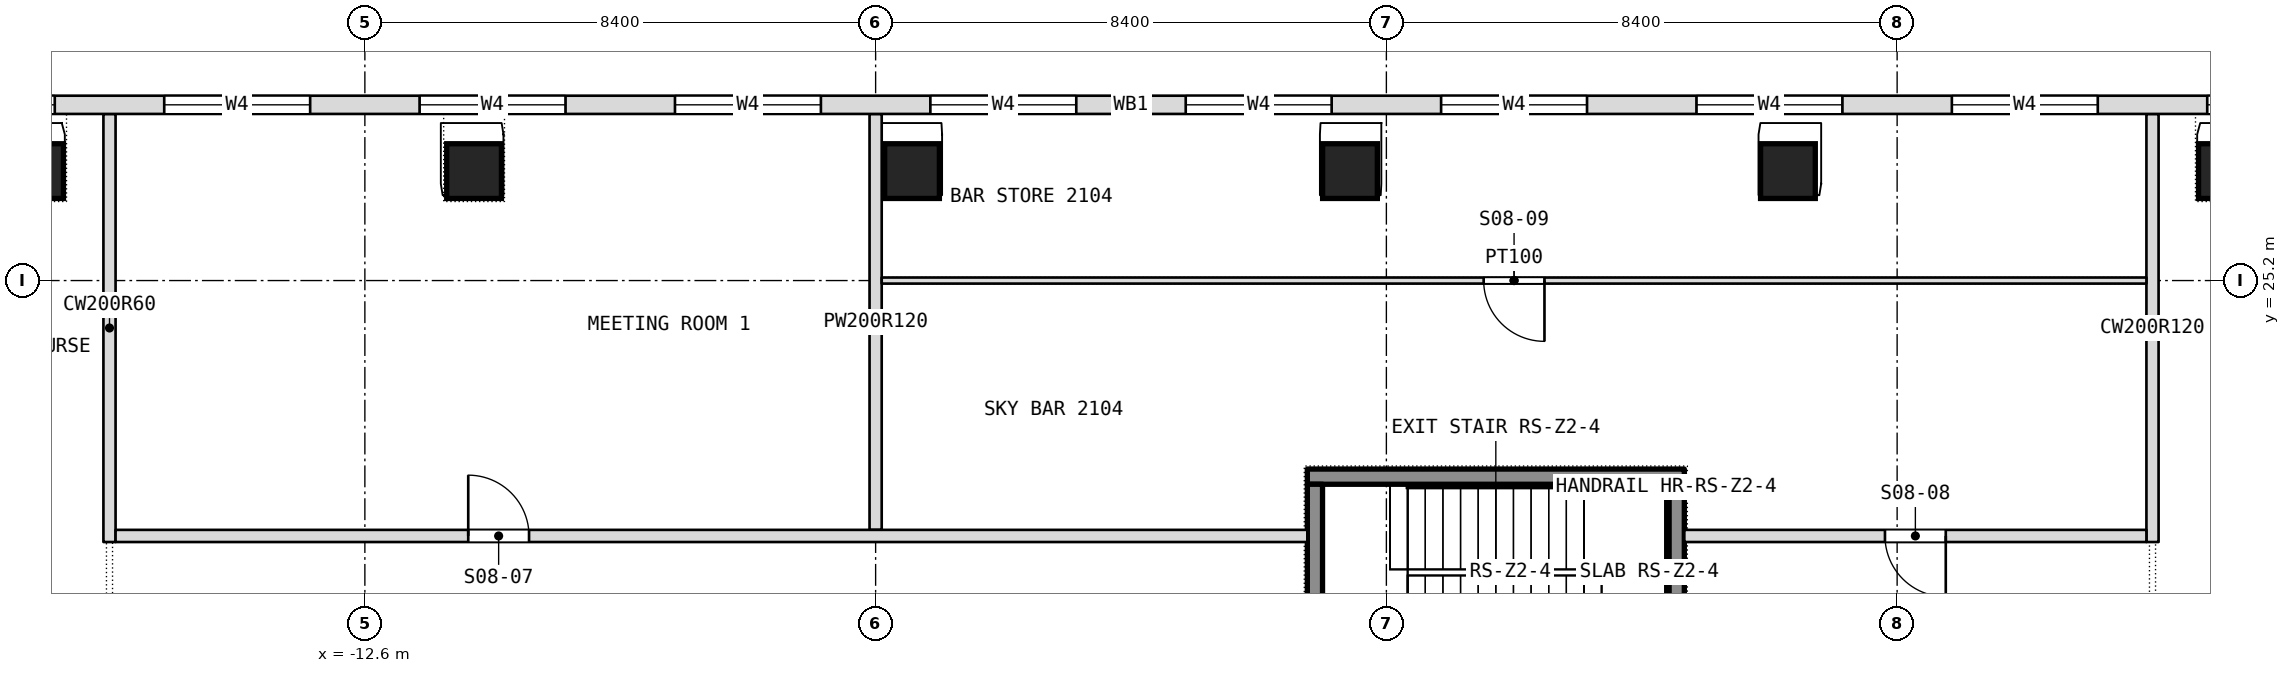
"""IFC4 building model, lengths in metres.
Left out: names, types, materials, properties, quantities, classifications, styles, units other than length and angle.
Written with IfcOpenShell. Run it as: python <this file> out.ifc"""

import sys

from ifc_helpers import new_model, si_unit, direction, frame, frame_2d, origin, origin_2d, place, context, subcontext, project, spatial, rectangle, extrude, element, fill, save


model = new_model("IFC4")
c1 = context("Model", 3, precision=1e-05, world=origin(), true_north=direction((0.0, 1.0)))
c2 = subcontext(c1, "Body", "Model", "MODEL_VIEW")
j1 = project(units=[si_unit("LENGTHUNIT", "METRE"), si_unit("PLANEANGLEUNIT", "RADIAN")], contexts=[c1])
p1 = place(None, origin())
s1 = spatial("IfcSite", under=j1, at=p1, CompositionType="ELEMENT")
p2 = place(p1, origin())
s2 = spatial("IfcBuilding", under=s1, at=p2, CompositionType="ELEMENT")
p3 = place(p2, frame((0.0, 0.0, 97.7)))
s3 = spatial("IfcBuildingStorey", under=s2, at=p3, CompositionType="ELEMENT", Elevation=97.7)
for number, where, z_axis, x_axis in (
    (1, (-18.007, 27.0, 0.0), (0.0, 0.0, 1.0), (1.0, 0.0, 0.0)),
    (2, (-10.804, 27.0, 0.0), (0.0, 0.0, 1.0), (1.0, 0.0, 0.0)),
    (3, (-3.601, 27.0, 0.0), (0.0, 0.0, 1.0), (1.0, 0.0, 0.0)),
    (4, (3.601, 27.0, 0.0), (0.0, 0.0, 1.0), (1.0, 0.0, 0.0)),
    (5, (10.804, 27.0, 0.0), (0.0, 0.0, 1.0), (1.0, 0.0, 0.0)),
    (6, (18.007, 27.0, 0.0), (0.0, 0.0, 1.0), (1.0, 0.0, 0.0)),
):
    element("IfcColumn", number, at=place(p3, frame(where, z_axis=z_axis, x_axis=x_axis)), inside=s3, PredefinedType="COLUMN", context=c2, shape_type="SweptSolid", body=[
        extrude(rectangle(XDim=0.9, YDim=0.9, at=origin_2d()), origin(), (0.0, 0.0, 1.0), 7.2),
    ])
p4 = place(p3, frame((16.8, 20.9, 0.0), z_axis=(0.0, 0.0, 1.0), x_axis=(0.0, 1.0, 0.0)))
e7 = element("IfcWall", 7, at=p4, inside=s3, PredefinedType="PARTITIONING", context=c2, shape_type="SweptSolid", body=[
    extrude(rectangle(XDim=7.04, YDim=0.2, at=frame_2d((3.52, 0.0))), origin(), (0.0, 0.0, 1.0), 6.94),
])
p5 = place(p3, frame((-4.2, 21.1, 0.0), z_axis=(0.0, 0.0, 1.0), x_axis=(0.0, 1.0, 0.0)))
e8 = element("IfcWall", 8, at=p5, inside=s3, PredefinedType="PARTITIONING", context=c2, shape_type="SweptSolid", body=[
    extrude(rectangle(XDim=6.84, YDim=0.2, at=frame_2d((3.42, 0.0))), origin(), (0.0, 0.0, 1.0), 6.94),
])
p6 = place(p3, frame((-16.8, 20.9, 0.0), z_axis=(0.0, 0.0, 1.0), x_axis=(0.0, 1.0, 0.0)))
e9 = element("IfcWall", 9, at=p6, inside=s3, PredefinedType="PARTITIONING", context=c2, shape_type="SweptSolid", body=[
    extrude(rectangle(XDim=7.04, YDim=0.2, at=frame_2d((3.52, 0.0))), origin(), (0.0, 0.0, 1.0), 6.94),
])
p7 = place(p3, frame((-16.7, 21.0, 0.0), z_axis=(0.0, 0.0, 1.0), x_axis=(1.0, 0.0, 0.0)))
e10 = element("IfcWall", 10, at=p7, inside=s3, PredefinedType="PARTITIONING", context=c2, shape_type="SweptSolid", body=[
    extrude(rectangle(XDim=19.6, YDim=0.2, at=frame_2d((9.8, 0.0))), origin(), (0.0, 0.0, 1.0), 6.94),
])
p8 = place(p7, frame((5.8, 0.0, 0.0)))
e11 = element("IfcOpeningElement", 11, at=p8, cuts=e10, PredefinedType="OPENING", context=c2, shape_type="SweptSolid", body=[
    extrude(rectangle(XDim=1.0, YDim=2.1, at=frame_2d((0.5, 1.05))), frame((0.0, 0.1, 0.0), z_axis=(0.0, -1.0, 0.0), x_axis=(1.0, 0.0, 0.0)), (0.0, 0.0, 1.0), 0.2),
])
p9 = place(p3, frame((9.1, 21.0, 0.0), z_axis=(0.0, 0.0, 1.0), x_axis=(1.0, 0.0, 0.0)))
e12 = element("IfcWall", 12, at=p9, inside=s3, PredefinedType="PARTITIONING", context=c2, shape_type="SweptSolid", body=[
    extrude(rectangle(XDim=7.6, YDim=0.2, at=frame_2d((3.8, 0.0))), origin(), (0.0, 0.0, 1.0), 6.94),
])
p10 = place(p9, frame((3.3, 0.0, 0.0)))
e13 = element("IfcOpeningElement", 13, at=p10, cuts=e12, PredefinedType="OPENING", context=c2, shape_type="SweptSolid", body=[
    extrude(rectangle(XDim=1.0, YDim=2.1, at=frame_2d((0.5, 1.05))), frame((0.0, 0.1, 0.0), z_axis=(0.0, -1.0, 0.0), x_axis=(1.0, 0.0, 0.0)), (0.0, 0.0, 1.0), 0.2),
])
p11 = place(p3, frame((-4.1, 25.2, 0.0), z_axis=(0.0, 0.0, 1.0), x_axis=(1.0, 0.0, 0.0)))
e14 = element("IfcWall", 14, at=p11, inside=s3, PredefinedType="PARTITIONING", context=c2, shape_type="SweptSolid", body=[
    extrude(rectangle(XDim=20.8, YDim=0.1, at=frame_2d((10.4, 0.0))), origin(), (0.0, 0.0, 1.0), 6.49),
])
p12 = place(p11, frame((9.9, 0.0, 0.0)))
e15 = element("IfcOpeningElement", 15, at=p12, cuts=e14, PredefinedType="OPENING", context=c2, shape_type="SweptSolid", body=[
    extrude(rectangle(XDim=1.0, YDim=2.1, at=frame_2d((0.5, 1.05))), frame((0.0, 0.05, 0.0), z_axis=(0.0, -1.0, 0.0), x_axis=(1.0, 0.0, 0.0)), (0.0, 0.0, 1.0), 0.1),
])
p13 = place(p3, frame((21.306, 28.09, 0.0), z_axis=(0.0, 0.0, 1.0), x_axis=(-1.0, 0.0, 0.0)))
e16 = element("IfcWall", 16, at=p13, inside=s3, PredefinedType="NOTDEFINED", context=c2, shape_type="SweptSolid", body=[
    extrude(rectangle(XDim=42.612, YDim=0.3, at=frame_2d((21.306, 0.0))), origin(), (0.0, 0.0, 1.0), 7.2),
])
p14 = place(p13, frame((1.206, 0.0, 0.9)))
e17 = element("IfcOpeningElement", 17, at=p14, cuts=e16, PredefinedType="OPENING", context=c2, shape_type="SweptSolid", body=[
    extrude(rectangle(XDim=2.4, YDim=4.5, at=frame_2d((1.2, 2.25))), frame((0.0, 0.15, 0.0), z_axis=(0.0, -1.0, 0.0), x_axis=(1.0, 0.0, 0.0)), (0.0, 0.0, 1.0), 0.3),
])
p15 = place(p13, frame((5.406, 0.0, 0.9)))
e18 = element("IfcOpeningElement", 18, at=p15, cuts=e16, PredefinedType="OPENING", context=c2, shape_type="SweptSolid", body=[
    extrude(rectangle(XDim=2.4, YDim=4.5, at=frame_2d((1.2, 2.25))), frame((0.0, 0.15, 0.0), z_axis=(0.0, -1.0, 0.0), x_axis=(1.0, 0.0, 0.0)), (0.0, 0.0, 1.0), 0.3),
])
p16 = place(p13, frame((9.606, 0.0, 0.9)))
e19 = element("IfcOpeningElement", 19, at=p16, cuts=e16, PredefinedType="OPENING", context=c2, shape_type="SweptSolid", body=[
    extrude(rectangle(XDim=2.4, YDim=4.5, at=frame_2d((1.2, 2.25))), frame((0.0, 0.15, 0.0), z_axis=(0.0, -1.0, 0.0), x_axis=(1.0, 0.0, 0.0)), (0.0, 0.0, 1.0), 0.3),
])
p17 = place(p13, frame((13.806, 0.0, 0.9)))
e20 = element("IfcOpeningElement", 20, at=p17, cuts=e16, PredefinedType="OPENING", context=c2, shape_type="SweptSolid", body=[
    extrude(rectangle(XDim=2.4, YDim=4.5, at=frame_2d((1.2, 2.25))), frame((0.0, 0.15, 0.0), z_axis=(0.0, -1.0, 0.0), x_axis=(1.0, 0.0, 0.0)), (0.0, 0.0, 1.0), 0.3),
])
p18 = place(p13, frame((18.006, 0.0, 0.9)))
e21 = element("IfcOpeningElement", 21, at=p18, cuts=e16, PredefinedType="OPENING", context=c2, shape_type="SweptSolid", body=[
    extrude(rectangle(XDim=2.4, YDim=4.5, at=frame_2d((1.2, 2.25))), frame((0.0, 0.15, 0.0), z_axis=(0.0, -1.0, 0.0), x_axis=(1.0, 0.0, 0.0)), (0.0, 0.0, 1.0), 0.3),
])
p19 = place(p13, frame((22.206, 0.0, 0.9)))
e22 = element("IfcOpeningElement", 22, at=p19, cuts=e16, PredefinedType="OPENING", context=c2, shape_type="SweptSolid", body=[
    extrude(rectangle(XDim=2.4, YDim=4.5, at=frame_2d((1.2, 2.25))), frame((0.0, 0.15, 0.0), z_axis=(0.0, -1.0, 0.0), x_axis=(1.0, 0.0, 0.0)), (0.0, 0.0, 1.0), 0.3),
])
p20 = place(p13, frame((26.406, 0.0, 0.9)))
e23 = element("IfcOpeningElement", 23, at=p20, cuts=e16, PredefinedType="OPENING", context=c2, shape_type="SweptSolid", body=[
    extrude(rectangle(XDim=2.4, YDim=4.5, at=frame_2d((1.2, 2.25))), frame((0.0, 0.15, 0.0), z_axis=(0.0, -1.0, 0.0), x_axis=(1.0, 0.0, 0.0)), (0.0, 0.0, 1.0), 0.3),
])
p21 = place(p13, frame((30.606, 0.0, 0.9)))
e24 = element("IfcOpeningElement", 24, at=p21, cuts=e16, PredefinedType="OPENING", context=c2, shape_type="SweptSolid", body=[
    extrude(rectangle(XDim=2.4, YDim=4.5, at=frame_2d((1.2, 2.25))), frame((0.0, 0.15, 0.0), z_axis=(0.0, -1.0, 0.0), x_axis=(1.0, 0.0, 0.0)), (0.0, 0.0, 1.0), 0.3),
])
p22 = place(p13, frame((34.806, 0.0, 0.9)))
e25 = element("IfcOpeningElement", 25, at=p22, cuts=e16, PredefinedType="OPENING", context=c2, shape_type="SweptSolid", body=[
    extrude(rectangle(XDim=2.4, YDim=4.5, at=frame_2d((1.2, 2.25))), frame((0.0, 0.15, 0.0), z_axis=(0.0, -1.0, 0.0), x_axis=(1.0, 0.0, 0.0)), (0.0, 0.0, 1.0), 0.3),
])
p23 = place(p13, frame((39.006, 0.0, 0.9)))
e26 = element("IfcOpeningElement", 26, at=p23, cuts=e16, PredefinedType="OPENING", context=c2, shape_type="SweptSolid", body=[
    extrude(rectangle(XDim=2.4, YDim=4.5, at=frame_2d((1.2, 2.25))), frame((0.0, 0.15, 0.0), z_axis=(0.0, -1.0, 0.0), x_axis=(1.0, 0.0, 0.0)), (0.0, 0.0, 1.0), 0.3),
])
p24 = place(p3, frame((2.9, 21.975, -0.26), z_axis=(0.0, 0.0, 1.0), x_axis=(1.0, 0.0, 0.0)))
e27 = element("IfcWall", 27, at=p24, inside=s3, PredefinedType="SHEAR", context=c2, shape_type="SweptSolid", body=[
    extrude(rectangle(XDim=6.2, YDim=0.25, at=frame_2d((3.1, 0.0))), origin(), (0.0, 0.0, 1.0), 7.56),
])
for number, where, z_axis, x_axis in (
    (28, (3.025, 18.95, -0.26), (0.0, 0.0, 1.0), (0.0, 1.0, 0.0)),
    (29, (8.975, 18.95, -0.26), (0.0, 0.0, 1.0), (0.0, 1.0, 0.0)),
):
    element("IfcWall", number, at=place(p3, frame(where, z_axis=z_axis, x_axis=x_axis)), inside=s3, PredefinedType="SHEAR", context=c2, shape_type="SweptSolid", body=[
        extrude(rectangle(XDim=2.9, YDim=0.25, at=frame_2d((1.45, 0.0))), origin(), (0.0, 0.0, 1.0), 7.56),
    ])
p25 = place(p8, origin())
e30 = element("IfcDoor", 30, at=p25, inside=s3, OperationType="SINGLE_SWING_LEFT", PredefinedType="DOOR", context=c2, shape_type="SweptSolid", body=[
    extrude(rectangle(XDim=1.0, YDim=2.1, at=frame_2d((0.5, 1.05))), frame((0.0, 0.025, 0.0), z_axis=(0.0, -1.0, 0.0), x_axis=(1.0, 0.0, 0.0)), (0.0, 0.0, 1.0), 0.05),
])
fill(e11, e30)
p26 = place(p10, origin())
e31 = element("IfcDoor", 31, at=p26, inside=s3, OperationType="SINGLE_SWING_LEFT", PredefinedType="DOOR", context=c2, shape_type="SweptSolid", body=[
    extrude(rectangle(XDim=1.0, YDim=2.1, at=frame_2d((0.5, 1.05))), frame((0.0, 0.025, 0.0), z_axis=(0.0, -1.0, 0.0), x_axis=(1.0, 0.0, 0.0)), (0.0, 0.0, 1.0), 0.05),
])
fill(e13, e31)
p27 = place(p12, origin())
e32 = element("IfcDoor", 32, at=p27, inside=s3, OperationType="SINGLE_SWING_LEFT", PredefinedType="DOOR", context=c2, shape_type="SweptSolid", body=[
    extrude(rectangle(XDim=1.0, YDim=2.1, at=frame_2d((0.5, 1.05))), frame((0.0, 0.025, 0.0), z_axis=(0.0, -1.0, 0.0), x_axis=(1.0, 0.0, 0.0)), (0.0, 0.0, 1.0), 0.05),
])
fill(e15, e32)
p28 = place(p14, origin())
e33 = element("IfcWindow", 33, at=p28, inside=s3, PartitioningType="SINGLE_PANEL", PredefinedType="WINDOW", context=c2, shape_type="SweptSolid", body=[
    extrude(rectangle(XDim=2.4, YDim=4.5, at=frame_2d((1.2, 2.25))), frame((0.0, 0.03, 0.0), z_axis=(0.0, -1.0, 0.0), x_axis=(1.0, 0.0, 0.0)), (0.0, 0.0, 1.0), 0.06),
])
fill(e17, e33)
p29 = place(p15, origin())
e34 = element("IfcWindow", 34, at=p29, inside=s3, PartitioningType="SINGLE_PANEL", PredefinedType="WINDOW", context=c2, shape_type="SweptSolid", body=[
    extrude(rectangle(XDim=2.4, YDim=4.5, at=frame_2d((1.2, 2.25))), frame((0.0, 0.03, 0.0), z_axis=(0.0, -1.0, 0.0), x_axis=(1.0, 0.0, 0.0)), (0.0, 0.0, 1.0), 0.06),
])
fill(e18, e34)
p30 = place(p16, origin())
e35 = element("IfcWindow", 35, at=p30, inside=s3, PartitioningType="SINGLE_PANEL", PredefinedType="WINDOW", context=c2, shape_type="SweptSolid", body=[
    extrude(rectangle(XDim=2.4, YDim=4.5, at=frame_2d((1.2, 2.25))), frame((0.0, 0.03, 0.0), z_axis=(0.0, -1.0, 0.0), x_axis=(1.0, 0.0, 0.0)), (0.0, 0.0, 1.0), 0.06),
])
fill(e19, e35)
p31 = place(p17, origin())
e36 = element("IfcWindow", 36, at=p31, inside=s3, PartitioningType="SINGLE_PANEL", PredefinedType="WINDOW", context=c2, shape_type="SweptSolid", body=[
    extrude(rectangle(XDim=2.4, YDim=4.5, at=frame_2d((1.2, 2.25))), frame((0.0, 0.03, 0.0), z_axis=(0.0, -1.0, 0.0), x_axis=(1.0, 0.0, 0.0)), (0.0, 0.0, 1.0), 0.06),
])
fill(e20, e36)
p32 = place(p18, origin())
e37 = element("IfcWindow", 37, at=p32, inside=s3, PartitioningType="SINGLE_PANEL", PredefinedType="WINDOW", context=c2, shape_type="SweptSolid", body=[
    extrude(rectangle(XDim=2.4, YDim=4.5, at=frame_2d((1.2, 2.25))), frame((0.0, 0.03, 0.0), z_axis=(0.0, -1.0, 0.0), x_axis=(1.0, 0.0, 0.0)), (0.0, 0.0, 1.0), 0.06),
])
fill(e21, e37)
p33 = place(p19, origin())
e38 = element("IfcWindow", 38, at=p33, inside=s3, PartitioningType="SINGLE_PANEL", PredefinedType="WINDOW", context=c2, shape_type="SweptSolid", body=[
    extrude(rectangle(XDim=2.4, YDim=4.5, at=frame_2d((1.2, 2.25))), frame((0.0, 0.03, 0.0), z_axis=(0.0, -1.0, 0.0), x_axis=(1.0, 0.0, 0.0)), (0.0, 0.0, 1.0), 0.06),
])
fill(e22, e38)
p34 = place(p20, origin())
e39 = element("IfcWindow", 39, at=p34, inside=s3, PartitioningType="SINGLE_PANEL", PredefinedType="WINDOW", context=c2, shape_type="SweptSolid", body=[
    extrude(rectangle(XDim=2.4, YDim=4.5, at=frame_2d((1.2, 2.25))), frame((0.0, 0.03, 0.0), z_axis=(0.0, -1.0, 0.0), x_axis=(1.0, 0.0, 0.0)), (0.0, 0.0, 1.0), 0.06),
])
fill(e23, e39)
p35 = place(p21, origin())
e40 = element("IfcWindow", 40, at=p35, inside=s3, PartitioningType="SINGLE_PANEL", PredefinedType="WINDOW", context=c2, shape_type="SweptSolid", body=[
    extrude(rectangle(XDim=2.4, YDim=4.5, at=frame_2d((1.2, 2.25))), frame((0.0, 0.03, 0.0), z_axis=(0.0, -1.0, 0.0), x_axis=(1.0, 0.0, 0.0)), (0.0, 0.0, 1.0), 0.06),
])
fill(e24, e40)
p36 = place(p22, origin())
e41 = element("IfcWindow", 41, at=p36, inside=s3, PartitioningType="SINGLE_PANEL", PredefinedType="WINDOW", context=c2, shape_type="SweptSolid", body=[
    extrude(rectangle(XDim=2.4, YDim=4.5, at=frame_2d((1.2, 2.25))), frame((0.0, 0.03, 0.0), z_axis=(0.0, -1.0, 0.0), x_axis=(1.0, 0.0, 0.0)), (0.0, 0.0, 1.0), 0.06),
])
fill(e25, e41)
p37 = place(p23, origin())
e42 = element("IfcWindow", 42, at=p37, inside=s3, PartitioningType="SINGLE_PANEL", PredefinedType="WINDOW", context=c2, shape_type="SweptSolid", body=[
    extrude(rectangle(XDim=2.4, YDim=4.5, at=frame_2d((1.2, 2.25))), frame((0.0, 0.03, 0.0), z_axis=(0.0, -1.0, 0.0), x_axis=(1.0, 0.0, 0.0)), (0.0, 0.0, 1.0), 0.06),
])
fill(e26, e42)
save(model, sys.argv[1])
